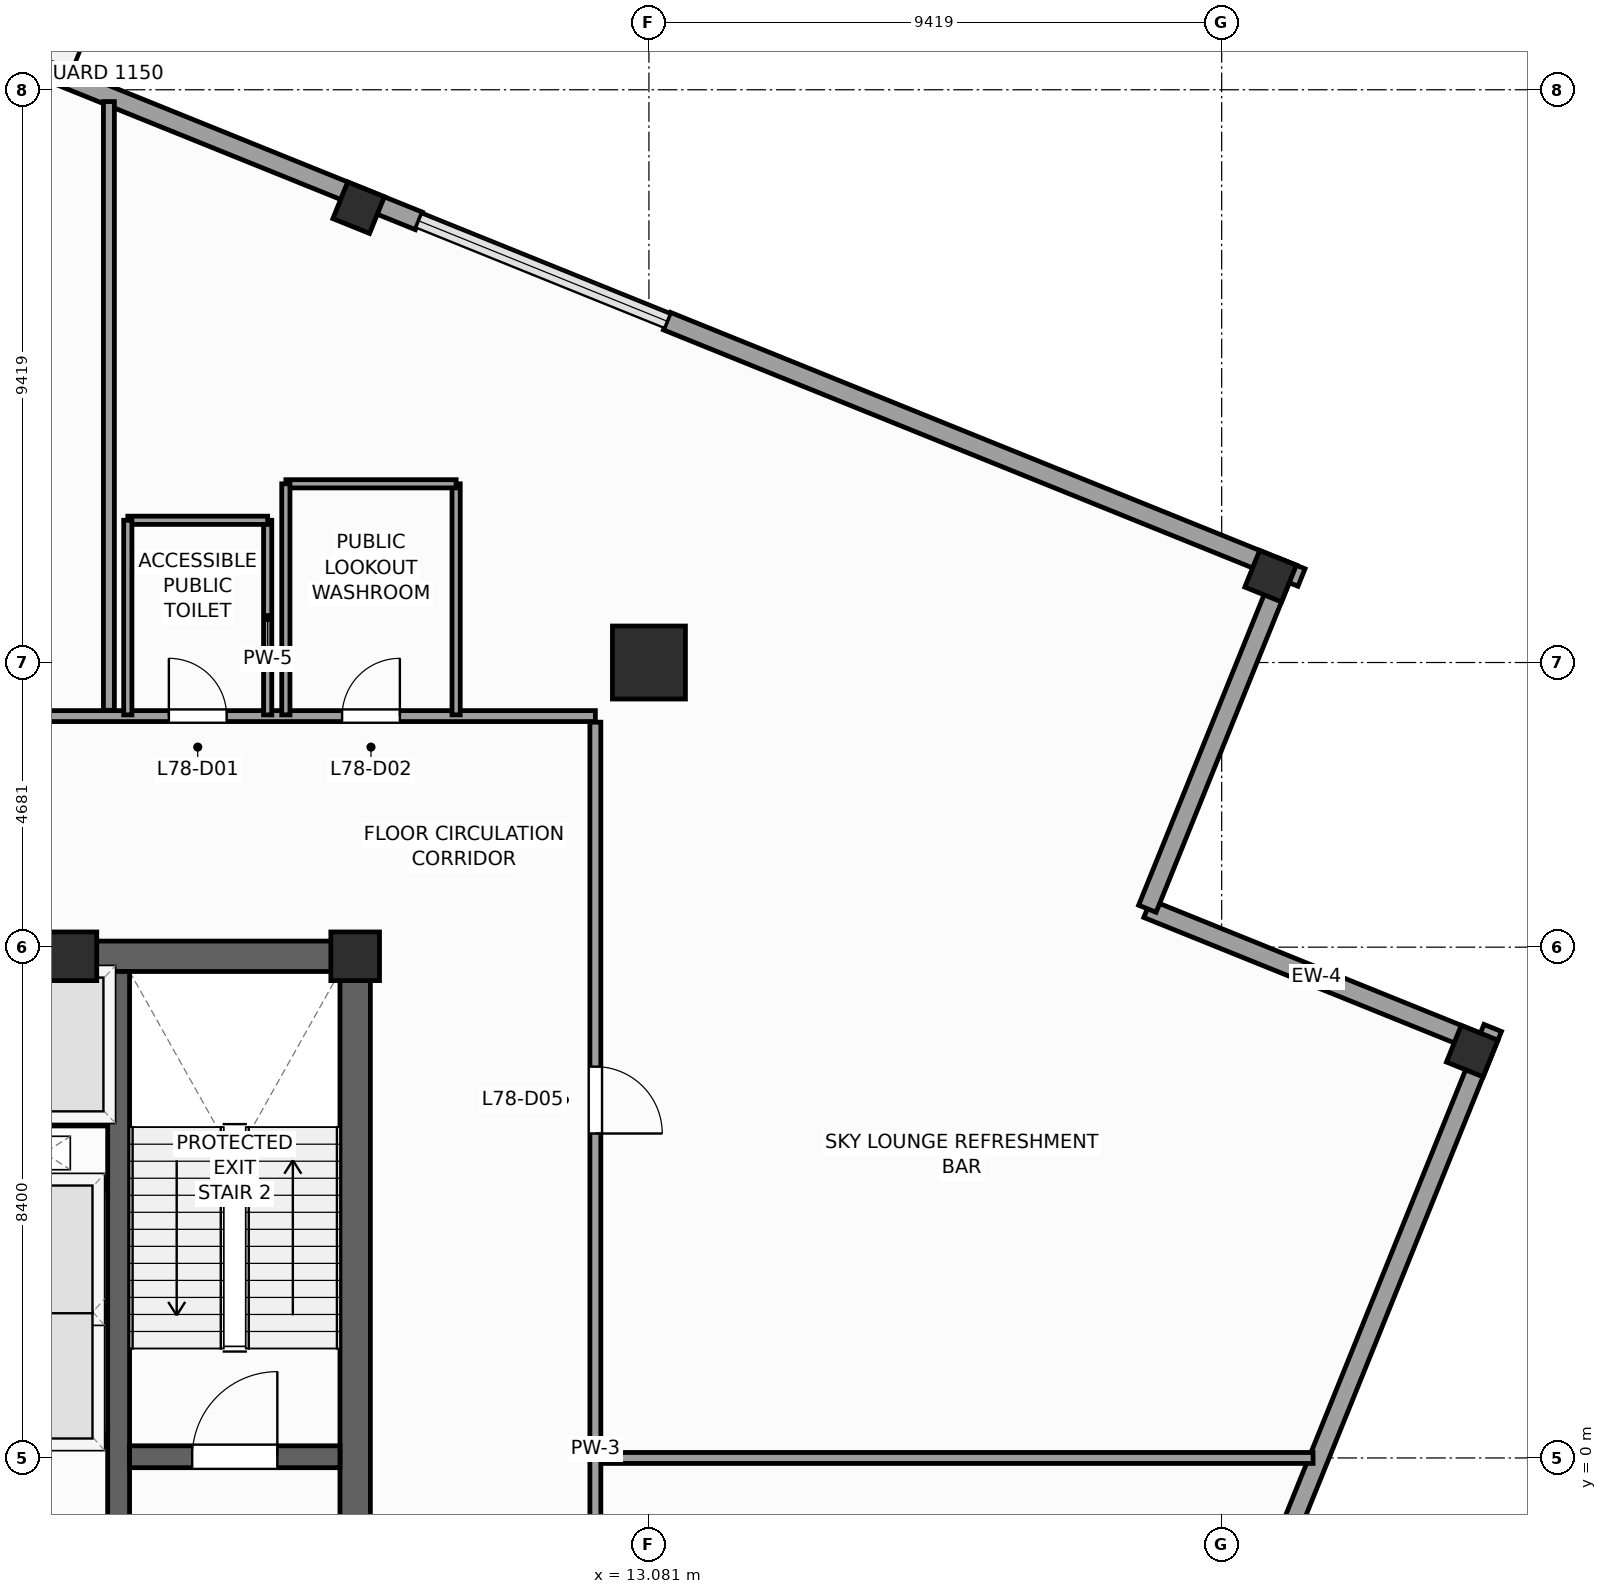
"""IFC4 building model, lengths in metres.
Left out: names, types, materials, properties, quantities, classifications, styles, units other than length and angle.
Written with IfcOpenShell. Run it as: python <this file> out.ifc"""

import sys

from ifc_helpers import new_model, si_unit, direction, frame, frame_2d, origin, origin_2d, place, context, subcontext, project, spatial, rectangle, extrude, source, transform, mapped, element, fill, save


model = new_model("IFC4")
c1 = context("Model", 3, precision=1e-05, world=origin(), true_north=direction((0.0, 1.0)))
c2 = subcontext(c1, "Body", "Model", "MODEL_VIEW")
j1 = project(units=[si_unit("LENGTHUNIT", "METRE"), si_unit("PLANEANGLEUNIT", "RADIAN")], contexts=[c1])
p1 = place(None, origin())
s1 = spatial("IfcSite", under=j1, at=p1, CompositionType="ELEMENT")
p2 = place(p1, origin())
s2 = spatial("IfcBuilding", under=s1, at=p2, CompositionType="ELEMENT")
p3 = place(p2, frame((0.0, 0.0, 316.8)))
s3 = spatial("IfcBuildingStorey", under=s2, at=p3, CompositionType="ELEMENT", Elevation=316.8)
p4 = place(p3, frame((-8.5, 8.25, 0.0), z_axis=(0.0, 0.0, 1.0), x_axis=(1.0, 0.0, 0.0)))
e1 = element("IfcWall", 1, at=p4, inside=s3, PredefinedType="SHEAR", context=c2, shape_type="SweptSolid", body=[
    extrude(rectangle(XDim=17.0, YDim=0.5, at=frame_2d((8.5, 0.0))), origin(), (0.0, 0.0, 1.0), 4.8),
])
p5 = place(p4, frame((7.85, 0.0, 0.0)))
e2 = element("IfcOpeningElement", 2, at=p5, cuts=e1, PredefinedType="OPENING", context=c2, shape_type="SweptSolid", body=[
    extrude(rectangle(XDim=1.3, YDim=2.2, at=frame_2d((0.65, 1.1))), frame((0.0, 0.26, 0.0), z_axis=(0.0, -1.0, 0.0), x_axis=(1.0, 0.0, 0.0)), (0.0, 0.0, 1.0), 0.52),
])
p6 = place(p3, frame((8.25, -8.0, 0.0), z_axis=(0.0, 0.0, 1.0), x_axis=(0.0, 1.0, 0.0)))
e3 = element("IfcWall", 3, at=p6, inside=s3, PredefinedType="SHEAR", context=c2, shape_type="SweptSolid", body=[
    extrude(rectangle(XDim=16.0, YDim=0.5, at=frame_2d((8.0, 0.0))), origin(), (0.0, 0.0, 1.0), 4.8),
])
p7 = place(p6, frame((4.69, 0.0, 0.0)))
e4 = element("IfcOpeningElement", 4, at=p7, cuts=e3, PredefinedType="OPENING", context=c2, shape_type="SweptSolid", body=[
    extrude(rectangle(XDim=1.3, YDim=2.2, at=frame_2d((0.65, 1.1))), frame((0.0, 0.26, 0.0), z_axis=(0.0, -1.0, 0.0), x_axis=(1.0, 0.0, 0.0)), (0.0, 0.0, 1.0), 0.52),
])
p8 = place(p3, frame((4.36, -8.0, 0.0), z_axis=(0.0, 0.0, 1.0), x_axis=(0.0, 1.0, 0.0)))
e5 = element("IfcWall", 5, at=p8, inside=s3, PredefinedType="SHEAR", context=c2, shape_type="SweptSolid", body=[
    extrude(rectangle(XDim=16.0, YDim=0.36, at=frame_2d((8.0, 0.0))), origin(), (0.0, 0.0, 1.0), 4.8),
])
p9 = place(p3, frame((4.54, 0.02, 0.0), z_axis=(0.0, 0.0, 1.0), x_axis=(1.0, 0.0, 0.0)))
e6 = element("IfcWall", 6, at=p9, inside=s3, PredefinedType="SHEAR", context=c2, shape_type="SweptSolid", body=[
    extrude(rectangle(XDim=3.46, YDim=0.36, at=frame_2d((1.73, 0.0))), origin(), (0.0, 0.0, 1.0), 4.8),
])
p10 = place(p9, frame((1.03, 0.0, 0.0)))
e7 = element("IfcOpeningElement", 7, at=p10, cuts=e6, PredefinedType="OPENING", context=c2, shape_type="SweptSolid", body=[
    extrude(rectangle(XDim=1.4, YDim=2.2, at=frame_2d((0.7, 1.1))), frame((0.0, 0.19, 0.0), z_axis=(0.0, -1.0, 0.0), x_axis=(1.0, 0.0, 0.0)), (0.0, 0.0, 1.0), 0.38),
])
m1 = source(origin(), c2, "Body", "SweptSolid", [
    extrude(rectangle(XDim=0.8, YDim=0.8, at=origin_2d()), origin(), (0.0, 0.0, 1.0), 4.8),
])
for number, where, z_axis, x_axis in (
    (8, (8.25, 8.25, 0.0), (0.0, 0.0, 1.0), (1.0, 0.0, 0.0)),
    (9, (3.6, 8.25, 0.0), (0.0, 0.0, 1.0), (1.0, 0.0, 0.0)),
):
    element("IfcColumn", number, at=place(p3, frame(where, z_axis=z_axis, x_axis=x_axis)), inside=s3, PredefinedType="PILASTER", context=c2, shape_type="MappedRepresentation", body=[
        mapped(m1, transform((0.0, 0.0, 0.0), scale=1.0)),
    ])
m2 = source(origin(), c2, "Body", "SweptSolid", [
    extrude(rectangle(XDim=1.2, YDim=1.2, at=origin_2d()), origin(), (0.0, 0.0, 1.0), 4.8),
])
p11 = place(p3, frame((13.081, 13.081, 0.0), z_axis=(0.0, 0.0, 1.0), x_axis=(1.0, 0.0, 0.0)))
e10 = element("IfcColumn", 10, at=p11, inside=s3, PredefinedType="COLUMN", context=c2, shape_type="MappedRepresentation", body=[
    mapped(m2, transform((0.0, 0.0, 0.0), scale=1.0)),
])
m3 = source(origin(), c2, "Body", "SweptSolid", [
    extrude(rectangle(XDim=0.65, YDim=0.65, at=origin_2d()), origin(), (0.0, 0.0, 1.0), 4.8),
])
for number, where, z_axis, x_axis in (
    (11, (26.62, 6.69, 0.0), (0.0, 0.0, 1.0), (0.375, 0.927, 0.0)),
    (12, (23.304, 14.501, 0.0), (0.0, 0.0, 1.0), (0.375, 0.927, 0.0)),
    (13, (8.307, 20.56, 0.0), (0.0, 0.0, 1.0), (0.375, 0.927, 0.0)),
):
    element("IfcColumn", number, at=place(p3, frame(where, z_axis=z_axis, x_axis=x_axis)), inside=s3, PredefinedType="COLUMN", context=c2, shape_type="MappedRepresentation", body=[
        mapped(m3, transform((0.0, 0.0, 0.0), scale=1.0)),
    ])
p12 = place(p3, frame((26.841, 6.784, 0.0), z_axis=(0.0, 0.0, 1.0), x_axis=(-0.927171722085, 0.374636620962, 0.0)))
e14 = element("IfcWall", 14, at=p12, inside=s3, PredefinedType="STANDARD", context=c2, shape_type="SweptSolid", body=[
    extrude(rectangle(XDim=6.0, YDim=0.31, at=frame_2d((3.0, 0.0))), origin(), (0.0, 0.0, 1.0), 2.92),
])
p13 = place(p3, frame((21.278, 9.032, 0.0), z_axis=(0.0, 0.0, 1.0), x_axis=(0.374602739196, 0.927185411764, 0.0)))
e15 = element("IfcWall", 15, at=p13, inside=s3, PredefinedType="STANDARD", context=c2, shape_type="SweptSolid", body=[
    extrude(rectangle(XDim=6.155, YDim=0.31, at=frame_2d((3.078, 0.0))), origin(), (0.0, 0.0, 1.0), 4.5),
])
p14 = place(p3, frame((20.343, -9.298, 0.0), z_axis=(0.0, 0.0, 1.0), x_axis=(0.374607087443, 0.927183654967, 0.0)))
e16 = element("IfcWall", 16, at=p14, inside=s3, PredefinedType="STANDARD", context=c2, shape_type="SweptSolid", body=[
    extrude(rectangle(XDim=17.655, YDim=0.31, at=frame_2d((8.828, 0.0))), origin(), (0.0, 0.0, 1.0), 2.92),
])
p15 = place(p3, frame((23.813, 14.479, 0.0), z_axis=(0.0, 0.0, 1.0), x_axis=(-0.927178527544, 0.374619777991, 0.0)))
e17 = element("IfcWall", 17, at=p15, inside=s3, PredefinedType="STANDARD", context=c2, shape_type="SweptSolid", body=[
    extrude(rectangle(XDim=11.255, YDim=0.31, at=frame_2d((5.627, 0.0))), origin(), (0.0, 0.0, 1.0), 2.92),
])
p16 = place(p3, frame((9.298, 20.343, 0.0), z_axis=(0.0, 0.0, 1.0), x_axis=(-0.927183654967, 0.374607087443, 0.0)))
e18 = element("IfcWall", 18, at=p16, inside=s3, PredefinedType="STANDARD", context=c2, shape_type="SweptSolid", body=[
    extrude(rectangle(XDim=17.655, YDim=0.31, at=frame_2d((8.828, 0.0))), origin(), (0.0, 0.0, 1.0), 2.92),
])
p17 = place(p16, frame((8.2, 0.0, 0.0)))
e19 = element("IfcOpeningElement", 19, at=p17, cuts=e18, PredefinedType="OPENING", context=c2, shape_type="SweptSolid", body=[
    extrude(rectangle(XDim=1.2, YDim=2.3, at=frame_2d((0.6, 1.15))), frame((0.0, 0.165, 0.0), z_axis=(0.0, -1.0, 0.0), x_axis=(1.0, 0.0, 0.0)), (0.0, 0.0, 1.0), 0.33),
])
for number, where, z_axis, x_axis in (
    (20, (1.89, 0.3, 0.0), (0.0, 0.0, 1.0), (1.0, 0.0, 0.0)),
    (21, (1.89, 4.49, 0.0), (0.0, 0.0, 1.0), (1.0, 0.0, 0.0)),
):
    element("IfcWall", number, at=place(p3, frame(where, z_axis=z_axis, x_axis=x_axis)), inside=s3, PredefinedType="PARTITIONING", context=c2, shape_type="SweptSolid", body=[
        extrude(rectangle(XDim=2.28, YDim=0.18, at=frame_2d((1.14, 0.0))), origin(), (0.0, 0.0, 1.0), 4.5),
    ])
p18 = place(p3, frame((1.9, 2.4, 0.0), z_axis=(0.0, 0.0, 1.0), x_axis=(1.0, 0.0, 0.0)))
e22 = element("IfcWall", 22, at=p18, inside=s3, PredefinedType="PARTITIONING", context=c2, shape_type="SweptSolid", body=[
    extrude(rectangle(XDim=2.26, YDim=0.12, at=frame_2d((1.13, 0.0))), origin(), (0.0, 0.0, 1.0), 4.5),
])
p19 = place(p3, frame((2.06, 5.52, 0.0), z_axis=(0.0, 0.0, 1.0), x_axis=(1.0, 0.0, 0.0)))
e23 = element("IfcWall", 23, at=p19, inside=s3, PredefinedType="PARTITIONING", context=c2, shape_type="SweptSolid", body=[
    extrude(rectangle(XDim=2.1, YDim=0.12, at=frame_2d((1.05, 0.0))), origin(), (0.0, 0.0, 1.0), 4.5),
])
p20 = place(p3, frame((-11.9, 12.2, 0.0), z_axis=(0.0, 0.0, 1.0), x_axis=(1.0, 0.0, 0.0)))
e24 = element("IfcWall", 24, at=p20, inside=s3, PredefinedType="PARTITIONING", context=c2, shape_type="SweptSolid", body=[
    extrude(rectangle(XDim=24.1, YDim=0.18, at=frame_2d((12.05, 0.0))), origin(), (0.0, 0.0, 1.0), 4.5),
])
p21 = place(p20, frame((17.086, 0.0, 0.0)))
e25 = element("IfcOpeningElement", 25, at=p21, cuts=e24, PredefinedType="OPENING", context=c2, shape_type="SweptSolid", body=[
    extrude(rectangle(XDim=0.95, YDim=2.1, at=frame_2d((0.475, 1.05))), frame((0.0, 0.1, 0.0), z_axis=(0.0, -1.0, 0.0), x_axis=(1.0, 0.0, 0.0)), (0.0, 0.0, 1.0), 0.2),
])
p22 = place(p20, frame((19.935, 0.0, 0.0)))
e26 = element("IfcOpeningElement", 26, at=p22, cuts=e24, PredefinedType="OPENING", context=c2, shape_type="SweptSolid", body=[
    extrude(rectangle(XDim=0.95, YDim=2.1, at=frame_2d((0.475, 1.05))), frame((0.0, 0.1, 0.0), z_axis=(0.0, -1.0, 0.0), x_axis=(1.0, 0.0, 0.0)), (0.0, 0.0, 1.0), 0.2),
])
p23 = place(p20, frame((11.35, 0.0, 0.0)))
e27 = element("IfcOpeningElement", 27, at=p23, cuts=e24, PredefinedType="OPENING", context=c2, shape_type="SweptSolid", body=[
    extrude(rectangle(XDim=1.1, YDim=2.2, at=frame_2d((0.55, 1.1))), frame((0.0, 0.1, 0.0), z_axis=(0.0, -1.0, 0.0), x_axis=(1.0, 0.0, 0.0)), (0.0, 0.0, 1.0), 0.2),
])
p24 = place(p3, frame((12.2, -11.8, 0.0), z_axis=(0.0, 0.0, 1.0), x_axis=(0.0, 1.0, 0.0)))
e28 = element("IfcWall", 28, at=p24, inside=s3, PredefinedType="PARTITIONING", context=c2, shape_type="SweptSolid", body=[
    extrude(rectangle(XDim=23.9, YDim=0.18, at=frame_2d((11.95, 0.0))), origin(), (0.0, 0.0, 1.0), 4.5),
])
p25 = place(p24, frame((17.135, 0.0, 0.0)))
e29 = element("IfcOpeningElement", 29, at=p25, cuts=e28, PredefinedType="OPENING", context=c2, shape_type="SweptSolid", body=[
    extrude(rectangle(XDim=1.1, YDim=2.2, at=frame_2d((0.55, 1.1))), frame((0.0, 0.1, 0.0), z_axis=(0.0, -1.0, 0.0), x_axis=(1.0, 0.0, 0.0)), (0.0, 0.0, 1.0), 0.2),
])
p26 = place(p24, frame((5.514, 0.0, 0.0)))
e30 = element("IfcOpeningElement", 30, at=p26, cuts=e28, PredefinedType="OPENING", context=c2, shape_type="SweptSolid", body=[
    extrude(rectangle(XDim=1.1, YDim=2.2, at=frame_2d((0.55, 1.1))), frame((0.0, 0.1, 0.0), z_axis=(0.0, -1.0, 0.0), x_axis=(1.0, 0.0, 0.0)), (0.0, 0.0, 1.0), 0.2),
])
p27 = place(p3, frame((4.2, 12.295, 0.0), z_axis=(0.0, 0.0, 1.0), x_axis=(0.0, 1.0, 0.0)))
e31 = element("IfcWall", 31, at=p27, inside=s3, PredefinedType="PARTITIONING", context=c2, shape_type="SweptSolid", body=[
    extrude(rectangle(XDim=10.011, YDim=0.18, at=frame_2d((5.005, 0.0))), origin(), (0.0, 0.0, 1.0), 4.5),
])
p28 = place(p3, frame((12.295, 0.0, 0.0), z_axis=(0.0, 0.0, 1.0), x_axis=(1.0, 0.0, 0.0)))
e32 = element("IfcWall", 32, at=p28, inside=s3, PredefinedType="PARTITIONING", context=c2, shape_type="SweptSolid", body=[
    extrude(rectangle(XDim=11.708, YDim=0.18, at=frame_2d((5.854, 0.0))), origin(), (0.0, 0.0, 1.0), 4.5),
])
p29 = place(p3, frame((6.811, 12.22, 0.0), z_axis=(0.0, 0.0, 1.0), x_axis=(0.0, 1.0, 0.0)))
e33 = element("IfcWall", 33, at=p29, inside=s3, PredefinedType="PARTITIONING", context=c2, shape_type="SweptSolid", body=[
    extrude(rectangle(XDim=3.2, YDim=0.135, at=frame_2d((1.6, 0.0))), origin(), (0.0, 0.0, 1.0), 4.5),
])
p30 = place(p3, frame((4.511, 15.42, 0.0), z_axis=(0.0, 0.0, 1.0), x_axis=(1.0, 0.0, 0.0)))
e34 = element("IfcWall", 34, at=p30, inside=s3, PredefinedType="PARTITIONING", context=c2, shape_type="SweptSolid", body=[
    extrude(rectangle(XDim=2.3, YDim=0.135, at=frame_2d((1.15, 0.0))), origin(), (0.0, 0.0, 1.0), 4.5),
])
p31 = place(p3, frame((4.511, 12.22, 0.0), z_axis=(0.0, 0.0, 1.0), x_axis=(0.0, 1.0, 0.0)))
e35 = element("IfcWall", 35, at=p31, inside=s3, PredefinedType="PARTITIONING", context=c2, shape_type="SweptSolid", body=[
    extrude(rectangle(XDim=3.2, YDim=0.135, at=frame_2d((1.6, 0.0))), origin(), (0.0, 0.0, 1.0), 4.5),
])
p32 = place(p3, frame((9.91, 12.22, 0.0), z_axis=(0.0, 0.0, 1.0), x_axis=(0.0, 1.0, 0.0)))
e36 = element("IfcWall", 36, at=p32, inside=s3, PredefinedType="PARTITIONING", context=c2, shape_type="SweptSolid", body=[
    extrude(rectangle(XDim=3.8, YDim=0.135, at=frame_2d((1.9, 0.0))), origin(), (0.0, 0.0, 1.0), 4.5),
])
p33 = place(p3, frame((7.11, 16.02, 0.0), z_axis=(0.0, 0.0, 1.0), x_axis=(1.0, 0.0, 0.0)))
e37 = element("IfcWall", 37, at=p33, inside=s3, PredefinedType="PARTITIONING", context=c2, shape_type="SweptSolid", body=[
    extrude(rectangle(XDim=2.8, YDim=0.135, at=frame_2d((1.4, 0.0))), origin(), (0.0, 0.0, 1.0), 2.95),
])
p34 = place(p3, frame((7.11, 12.22, 0.0), z_axis=(0.0, 0.0, 1.0), x_axis=(0.0, 1.0, 0.0)))
e38 = element("IfcWall", 38, at=p34, inside=s3, PredefinedType="PARTITIONING", context=c2, shape_type="SweptSolid", body=[
    extrude(rectangle(XDim=3.8, YDim=0.135, at=frame_2d((1.9, 0.0))), origin(), (0.0, 0.0, 1.0), 4.5),
])
m4 = source(origin(), c2, "Body", "SweptSolid", [
    extrude(rectangle(XDim=1.4, YDim=2.2, at=frame_2d((0.7, 1.1))), frame((0.0, 0.025, 0.0), z_axis=(0.0, -1.0, 0.0), x_axis=(1.0, 0.0, 0.0)), (0.0, 0.0, 1.0), 0.05),
])
p35 = place(p10, origin())
e39 = element("IfcDoor", 39, at=p35, inside=s3, OperationType="SINGLE_SWING_RIGHT", PredefinedType="DOOR", context=c2, shape_type="MappedRepresentation", body=[
    mapped(m4, transform((0.0, 0.0, 0.0), scale=1.0)),
])
fill(e7, e39)
m5 = source(origin(), c2, "Body", "SweptSolid", [
    extrude(rectangle(XDim=0.95, YDim=2.1, at=frame_2d((0.475, 1.05))), frame((0.0, 0.025, 0.0), z_axis=(0.0, -1.0, 0.0), x_axis=(1.0, 0.0, 0.0)), (0.0, 0.0, 1.0), 0.05),
])
p36 = place(p21, origin())
e40 = element("IfcDoor", 40, at=p36, inside=s3, OperationType="SINGLE_SWING_LEFT", PredefinedType="DOOR", context=c2, shape_type="MappedRepresentation", body=[
    mapped(m5, transform((0.0, 0.0, 0.0), scale=1.0)),
])
fill(e25, e40)
p37 = place(p22, origin())
e41 = element("IfcDoor", 41, at=p37, inside=s3, OperationType="SINGLE_SWING_RIGHT", PredefinedType="DOOR", context=c2, shape_type="MappedRepresentation", body=[
    mapped(m5, transform((0.0, 0.0, 0.0), scale=1.0)),
])
fill(e26, e41)
m6 = source(origin(), c2, "Body", "SweptSolid", [
    extrude(rectangle(XDim=1.1, YDim=2.2, at=frame_2d((0.55, 1.1))), frame((0.0, 0.025, 0.0), z_axis=(0.0, -1.0, 0.0), x_axis=(1.0, 0.0, 0.0)), (0.0, 0.0, 1.0), 0.05),
])
p38 = place(p25, frame((1.1, 0.0, 0.0), z_axis=(0.0, 0.0, 1.0), x_axis=(-1.0, 0.0, 0.0)))
e42 = element("IfcDoor", 42, at=p38, inside=s3, OperationType="SINGLE_SWING_LEFT", PredefinedType="DOOR", context=c2, shape_type="MappedRepresentation", body=[
    mapped(m6, transform((0.0, 0.0, 0.0), scale=1.0)),
])
fill(e29, e42)
save(model, sys.argv[1])
